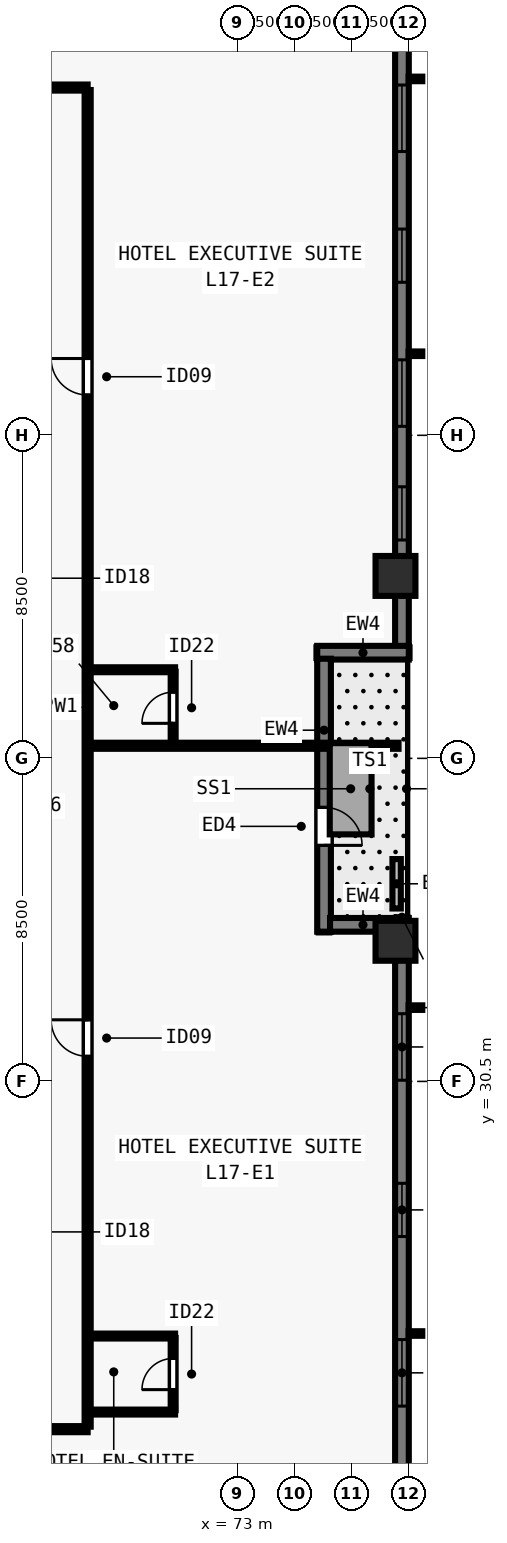
"""IFC4 building model, lengths in metres.
Left out: names, types, materials, properties, quantities, classifications, styles, units other than length and angle.
Written with IfcOpenShell. Run it as: python <this file> out.ifc"""

import sys

from ifc_helpers import new_model, si_unit, direction, frame, frame_2d, origin, origin_2d, place, context, subcontext, project, spatial, rectangle, extrude, element, fill, save


model = new_model("IFC4")
c1 = context("Model", 3, precision=1e-05, world=origin(), true_north=direction((0.0, 1.0)))
c2 = subcontext(c1, "Body", "Model", "MODEL_VIEW")
j1 = project(units=[si_unit("LENGTHUNIT", "METRE"), si_unit("PLANEANGLEUNIT", "RADIAN")], contexts=[c1])
p1 = place(None, origin())
s1 = spatial("IfcSite", under=j1, at=p1, CompositionType="ELEMENT")
p2 = place(p1, origin())
s2 = spatial("IfcBuilding", under=s1, at=p2, CompositionType="ELEMENT")
p3 = place(p2, frame((0.0, 0.0, 65.5)))
s3 = spatial("IfcBuildingStorey", under=s2, at=p3, CompositionType="ELEMENT", Elevation=65.5)
for number, where, z_axis, x_axis in (
    (1, (77.15, 34.2, 0.0), (0.0, 0.0, 1.0), (0.0, 1.0, 0.0)),
    (2, (77.15, 43.8, 0.0), (0.0, 0.0, 1.0), (0.0, 1.0, 0.0)),
):
    element("IfcColumn", number, at=place(p3, frame(where, z_axis=z_axis, x_axis=x_axis)), inside=s3, PredefinedType="COLUMN", context=c2, shape_type="SweptSolid", body=[
        extrude(rectangle(XDim=1.05, YDim=1.05, at=origin_2d()), origin(), (0.0, 0.0, 1.0), 3.5),
    ])
p4 = place(p3, frame((77.32, 34.8, 0.0), z_axis=(0.0, 0.0, 1.0), x_axis=(0.0, -1.0, 0.0)))
e3 = element("IfcWall", 3, at=p4, inside=s3, PredefinedType="SOLIDWALL", context=c2, shape_type="SweptSolid", body=[
    extrude(rectangle(XDim=17.962, YDim=0.36, at=frame_2d((8.981, 0.0))), origin(), (0.0, 0.0, 1.0), 3.28),
])
p5 = place(p4, frame((2.519, 0.0, 0.8)))
e4 = element("IfcOpeningElement", 4, at=p5, cuts=e3, PredefinedType="OPENING", context=c2, shape_type="SweptSolid", body=[
    extrude(rectangle(XDim=1.75, YDim=1.544, at=frame_2d((0.875, 0.772))), frame((0.0, 0.19, 0.0), z_axis=(0.0, -1.0, 0.0), x_axis=(1.0, 0.0, 0.0)), (0.0, 0.0, 1.0), 0.38),
])
p6 = place(p4, frame((6.981, 0.0, 0.8)))
e5 = element("IfcOpeningElement", 5, at=p6, cuts=e3, PredefinedType="OPENING", context=c2, shape_type="SweptSolid", body=[
    extrude(rectangle(XDim=1.4, YDim=1.544, at=frame_2d((0.7, 0.772))), frame((0.0, 0.19, 0.0), z_axis=(0.0, -1.0, 0.0), x_axis=(1.0, 0.0, 0.0)), (0.0, 0.0, 1.0), 0.38),
])
p7 = place(p4, frame((11.093, 0.0, 0.8)))
e6 = element("IfcOpeningElement", 6, at=p7, cuts=e3, PredefinedType="OPENING", context=c2, shape_type="SweptSolid", body=[
    extrude(rectangle(XDim=1.75, YDim=1.544, at=frame_2d((0.875, 0.772))), frame((0.0, 0.19, 0.0), z_axis=(0.0, -1.0, 0.0), x_axis=(1.0, 0.0, 0.0)), (0.0, 0.0, 1.0), 0.38),
])
p8 = place(p3, frame((77.32, 61.5, 0.0), z_axis=(0.0, 0.0, 1.0), x_axis=(0.0, -1.0, 0.0)))
e7 = element("IfcWall", 7, at=p8, inside=s3, PredefinedType="SOLIDWALL", context=c2, shape_type="SweptSolid", body=[
    extrude(rectangle(XDim=19.562, YDim=0.36, at=frame_2d((9.781, 0.0))), origin(), (0.0, 0.0, 1.0), 3.28),
])
p9 = place(p8, frame((4.783, 0.0, 0.8)))
e8 = element("IfcOpeningElement", 8, at=p9, cuts=e7, PredefinedType="OPENING", context=c2, shape_type="SweptSolid", body=[
    extrude(rectangle(XDim=1.75, YDim=1.544, at=frame_2d((0.875, 0.772))), frame((0.0, 0.19, 0.0), z_axis=(0.0, -1.0, 0.0), x_axis=(1.0, 0.0, 0.0)), (0.0, 0.0, 1.0), 0.38),
])
p10 = place(p8, frame((8.573, 0.0, 0.8)))
e9 = element("IfcOpeningElement", 9, at=p10, cuts=e7, PredefinedType="OPENING", context=c2, shape_type="SweptSolid", body=[
    extrude(rectangle(XDim=1.4, YDim=1.544, at=frame_2d((0.7, 0.772))), frame((0.0, 0.19, 0.0), z_axis=(0.0, -1.0, 0.0), x_axis=(1.0, 0.0, 0.0)), (0.0, 0.0, 1.0), 0.38),
])
p11 = place(p8, frame((12.014, 0.0, 0.8)))
e10 = element("IfcOpeningElement", 10, at=p11, cuts=e7, PredefinedType="OPENING", context=c2, shape_type="SweptSolid", body=[
    extrude(rectangle(XDim=1.75, YDim=1.544, at=frame_2d((0.875, 0.772))), frame((0.0, 0.19, 0.0), z_axis=(0.0, -1.0, 0.0), x_axis=(1.0, 0.0, 0.0)), (0.0, 0.0, 1.0), 0.38),
])
p12 = place(p8, frame((15.354, 0.0, 0.8)))
e11 = element("IfcOpeningElement", 11, at=p12, cuts=e7, PredefinedType="OPENING", context=c2, shape_type="SweptSolid", body=[
    extrude(rectangle(XDim=1.4, YDim=1.544, at=frame_2d((0.7, 0.772))), frame((0.0, 0.19, 0.0), z_axis=(0.0, -1.0, 0.0), x_axis=(1.0, 0.0, 0.0)), (0.0, 0.0, 1.0), 0.38),
])
p13 = place(p3, frame((77.5, 41.78, 0.0), z_axis=(0.0, 0.0, 1.0), x_axis=(-1.0, 0.0, 0.0)))
e12 = element("IfcWall", 12, at=p13, inside=s3, PredefinedType="SOLIDWALL", context=c2, shape_type="SweptSolid", body=[
    extrude(rectangle(XDim=2.41, YDim=0.36, at=frame_2d((1.205, 0.0))), origin(), (0.0, 0.0, 1.0), 3.28),
])
p14 = place(p3, frame((75.27, 41.622, 0.0), z_axis=(0.0, 0.0, 1.0), x_axis=(0.0, -1.0, 0.0)))
e13 = element("IfcWall", 13, at=p14, inside=s3, PredefinedType="SOLIDWALL", context=c2, shape_type="SweptSolid", body=[
    extrude(rectangle(XDim=7.182, YDim=0.36, at=frame_2d((3.591, 0.0))), origin(), (0.0, 0.0, 1.0), 3.28),
])
p15 = place(p14, frame((3.911, 0.0, 0.0)))
e14 = element("IfcOpeningElement", 14, at=p15, cuts=e13, PredefinedType="OPENING", context=c2, shape_type="SweptSolid", body=[
    extrude(rectangle(XDim=1.0, YDim=2.15, at=frame_2d((0.5, 1.075))), frame((0.0, 0.19, 0.0), z_axis=(0.0, -1.0, 0.0), x_axis=(1.0, 0.0, 0.0)), (0.0, 0.0, 1.0), 0.38),
])
p16 = place(p3, frame((75.428, 34.62, 0.0), z_axis=(0.0, 0.0, 1.0), x_axis=(1.0, 0.0, 0.0)))
e15 = element("IfcWall", 15, at=p16, inside=s3, PredefinedType="SOLIDWALL", context=c2, shape_type="SweptSolid", body=[
    extrude(rectangle(XDim=1.734, YDim=0.36, at=frame_2d((0.867, 0.0))), origin(), (0.0, 0.0, 1.0), 3.28),
])
p17 = place(p3, frame((77.18, 35.05, 0.0), z_axis=(0.0, 0.0, 1.0), x_axis=(0.0, 1.0, 0.0)))
e16 = element("IfcWall", 16, at=p17, inside=s3, PredefinedType="PARAPET", context=c2, shape_type="SweptSolid", body=[
    extrude(rectangle(XDim=1.3, YDim=0.22, at=frame_2d((0.65, 0.0))), origin(), (0.0, 0.0, 1.0), 0.55),
])
p18 = place(p3, frame((34.95, 21.35, 0.0), z_axis=(0.0, 0.0, 1.0), x_axis=(1.0, 0.0, 0.0)))
e17 = element("IfcWall", 17, at=p18, inside=s3, PredefinedType="PARTITIONING", context=c2, shape_type="SweptSolid", body=[
    extrude(rectangle(XDim=34.1, YDim=0.16, at=frame_2d((17.05, 0.0))), origin(), (0.0, 0.0, 1.0), 3.28),
])
p19 = place(p18, frame((3.614, 0.0, 0.0)))
e18 = element("IfcOpeningElement", 18, at=p19, cuts=e17, PredefinedType="OPENING", context=c2, shape_type="SweptSolid", body=[
    extrude(rectangle(XDim=0.96, YDim=2.15, at=frame_2d((0.48, 1.075))), frame((0.0, 0.09, 0.0), z_axis=(0.0, -1.0, 0.0), x_axis=(1.0, 0.0, 0.0)), (0.0, 0.0, 1.0), 0.18),
])
p20 = place(p18, frame((17.56, 0.0, 0.0)))
e19 = element("IfcOpeningElement", 19, at=p20, cuts=e17, PredefinedType="OPENING", context=c2, shape_type="SweptSolid", body=[
    extrude(rectangle(XDim=0.96, YDim=2.15, at=frame_2d((0.48, 1.075))), frame((0.0, 0.09, 0.0), z_axis=(0.0, -1.0, 0.0), x_axis=(1.0, 0.0, 0.0)), (0.0, 0.0, 1.0), 0.18),
])
p21 = place(p18, frame((30.516, 0.0, 0.0)))
e20 = element("IfcOpeningElement", 20, at=p21, cuts=e17, PredefinedType="OPENING", context=c2, shape_type="SweptSolid", body=[
    extrude(rectangle(XDim=0.96, YDim=2.15, at=frame_2d((0.48, 1.075))), frame((0.0, 0.09, 0.0), z_axis=(0.0, -1.0, 0.0), x_axis=(1.0, 0.0, 0.0)), (0.0, 0.0, 1.0), 0.18),
])
p22 = place(p3, frame((34.95, 56.65, 0.0), z_axis=(0.0, 0.0, 1.0), x_axis=(1.0, 0.0, 0.0)))
e21 = element("IfcWall", 21, at=p22, inside=s3, PredefinedType="PARTITIONING", context=c2, shape_type="SweptSolid", body=[
    extrude(rectangle(XDim=34.1, YDim=0.16, at=frame_2d((17.05, 0.0))), origin(), (0.0, 0.0, 1.0), 3.28),
])
p23 = place(p22, frame((4.166, 0.0, 0.0)))
e22 = element("IfcOpeningElement", 22, at=p23, cuts=e21, PredefinedType="OPENING", context=c2, shape_type="SweptSolid", body=[
    extrude(rectangle(XDim=0.96, YDim=2.15, at=frame_2d((0.48, 1.075))), frame((0.0, 0.09, 0.0), z_axis=(0.0, -1.0, 0.0), x_axis=(1.0, 0.0, 0.0)), (0.0, 0.0, 1.0), 0.18),
])
p24 = place(p22, frame((17.73, 0.0, 0.0)))
e23 = element("IfcOpeningElement", 23, at=p24, cuts=e21, PredefinedType="OPENING", context=c2, shape_type="SweptSolid", body=[
    extrude(rectangle(XDim=0.96, YDim=2.15, at=frame_2d((0.48, 1.075))), frame((0.0, 0.09, 0.0), z_axis=(0.0, -1.0, 0.0), x_axis=(1.0, 0.0, 0.0)), (0.0, 0.0, 1.0), 0.18),
])
p25 = place(p22, frame((30.134, 0.0, 0.0)))
e24 = element("IfcOpeningElement", 24, at=p25, cuts=e21, PredefinedType="OPENING", context=c2, shape_type="SweptSolid", body=[
    extrude(rectangle(XDim=0.96, YDim=2.15, at=frame_2d((0.48, 1.075))), frame((0.0, 0.09, 0.0), z_axis=(0.0, -1.0, 0.0), x_axis=(1.0, 0.0, 0.0)), (0.0, 0.0, 1.0), 0.18),
])
p26 = place(p3, frame((69.05, 21.415, 0.0), z_axis=(0.0, 0.0, 1.0), x_axis=(0.0, 1.0, 0.0)))
e25 = element("IfcWall", 25, at=p26, inside=s3, PredefinedType="PARTITIONING", context=c2, shape_type="SweptSolid", body=[
    extrude(rectangle(XDim=35.17, YDim=0.16, at=frame_2d((17.585, 0.0))), origin(), (0.0, 0.0, 1.0), 3.28),
])
p27 = place(p26, frame((9.746, 0.0, 0.0)))
e26 = element("IfcOpeningElement", 26, at=p27, cuts=e25, PredefinedType="OPENING", context=c2, shape_type="SweptSolid", body=[
    extrude(rectangle(XDim=0.96, YDim=2.15, at=frame_2d((0.48, 1.075))), frame((0.0, 0.09, 0.0), z_axis=(0.0, -1.0, 0.0), x_axis=(1.0, 0.0, 0.0)), (0.0, 0.0, 1.0), 0.18),
])
p28 = place(p26, frame((27.146, 0.0, 0.0)))
e27 = element("IfcOpeningElement", 27, at=p28, cuts=e25, PredefinedType="OPENING", context=c2, shape_type="SweptSolid", body=[
    extrude(rectangle(XDim=0.96, YDim=2.15, at=frame_2d((0.48, 1.075))), frame((0.0, 0.09, 0.0), z_axis=(0.0, -1.0, 0.0), x_axis=(1.0, 0.0, 0.0)), (0.0, 0.0, 1.0), 0.18),
])
p29 = place(p3, frame((69.115, 21.8, 0.0), z_axis=(0.0, 0.0, 1.0), x_axis=(1.0, 0.0, 0.0)))
e28 = element("IfcWall", 28, at=p29, inside=s3, PredefinedType="PLUMBINGWALL", context=c2, shape_type="SweptSolid", body=[
    extrude(rectangle(XDim=2.235, YDim=0.13, at=frame_2d((1.118, 0.0))), origin(), (0.0, 0.0, 1.0), 2.849),
])
p30 = place(p3, frame((69.115, 23.8, 0.0), z_axis=(0.0, 0.0, 1.0), x_axis=(1.0, 0.0, 0.0)))
e29 = element("IfcWall", 29, at=p30, inside=s3, PredefinedType="PLUMBINGWALL", context=c2, shape_type="SweptSolid", body=[
    extrude(rectangle(XDim=2.235, YDim=0.13, at=frame_2d((1.118, 0.0))), origin(), (0.0, 0.0, 1.0), 3.28),
])
p31 = place(p3, frame((71.3, 21.85, 0.0), z_axis=(0.0, 0.0, 1.0), x_axis=(0.0, 1.0, 0.0)))
e30 = element("IfcWall", 30, at=p31, inside=s3, PredefinedType="PLUMBINGWALL", context=c2, shape_type="SweptSolid", body=[
    extrude(rectangle(XDim=1.9, YDim=0.13, at=frame_2d((0.95, 0.0))), origin(), (0.0, 0.0, 1.0), 3.28),
])
p32 = place(p31, frame((0.54, 0.0, 0.0)))
e31 = element("IfcOpeningElement", 31, at=p32, cuts=e30, PredefinedType="OPENING", context=c2, shape_type="SweptSolid", body=[
    extrude(rectangle(XDim=0.82, YDim=2.1, at=frame_2d((0.41, 1.05))), frame((0.0, 0.075, 0.0), z_axis=(0.0, -1.0, 0.0), x_axis=(1.0, 0.0, 0.0)), (0.0, 0.0, 1.0), 0.15),
])
p33 = place(p3, frame((69.115, 39.332, 0.0), z_axis=(0.0, 0.0, 1.0), x_axis=(1.0, 0.0, 0.0)))
e32 = element("IfcWall", 32, at=p33, inside=s3, PredefinedType="PARTITIONING", context=c2, shape_type="SweptSolid", body=[
    extrude(rectangle(XDim=8.115, YDim=0.16, at=frame_2d((4.058, 0.0))), origin(), (0.0, 0.0, 1.0), 3.28),
])
p34 = place(p3, frame((69.115, 41.332, 0.0), z_axis=(0.0, 0.0, 1.0), x_axis=(1.0, 0.0, 0.0)))
e33 = element("IfcWall", 33, at=p34, inside=s3, PredefinedType="PLUMBINGWALL", context=c2, shape_type="SweptSolid", body=[
    extrude(rectangle(XDim=2.235, YDim=0.13, at=frame_2d((1.118, 0.0))), origin(), (0.0, 0.0, 1.0), 3.28),
])
p35 = place(p3, frame((71.3, 39.396, 0.0), z_axis=(0.0, 0.0, 1.0), x_axis=(0.0, 1.0, 0.0)))
e34 = element("IfcWall", 34, at=p35, inside=s3, PredefinedType="PLUMBINGWALL", context=c2, shape_type="SweptSolid", body=[
    extrude(rectangle(XDim=1.885, YDim=0.13, at=frame_2d((0.942, 0.0))), origin(), (0.0, 0.0, 1.0), 3.28),
])
p36 = place(p35, frame((0.525, 0.0, 0.0)))
e35 = element("IfcOpeningElement", 35, at=p36, cuts=e34, PredefinedType="OPENING", context=c2, shape_type="SweptSolid", body=[
    extrude(rectangle(XDim=0.82, YDim=2.1, at=frame_2d((0.41, 1.05))), frame((0.0, 0.075, 0.0), z_axis=(0.0, -1.0, 0.0), x_axis=(1.0, 0.0, 0.0)), (0.0, 0.0, 1.0), 0.15),
])
p37 = place(p5, origin())
e36 = element("IfcWindow", 36, at=p37, inside=s3, PartitioningType="SINGLE_PANEL", PredefinedType="WINDOW", context=c2, shape_type="SweptSolid", body=[
    extrude(rectangle(XDim=1.75, YDim=1.544, at=frame_2d((0.875, 0.772))), frame((0.0, -0.05, 0.0), z_axis=(0.0, -1.0, 0.0), x_axis=(1.0, 0.0, 0.0)), (0.0, 0.0, 1.0), 0.06),
])
fill(e4, e36)
p38 = place(p6, origin())
e37 = element("IfcWindow", 37, at=p38, inside=s3, PartitioningType="SINGLE_PANEL", PredefinedType="WINDOW", context=c2, shape_type="SweptSolid", body=[
    extrude(rectangle(XDim=1.4, YDim=1.544, at=frame_2d((0.7, 0.772))), frame((0.0, -0.05, 0.0), z_axis=(0.0, -1.0, 0.0), x_axis=(1.0, 0.0, 0.0)), (0.0, 0.0, 1.0), 0.06),
])
fill(e5, e37)
p39 = place(p7, origin())
e38 = element("IfcWindow", 38, at=p39, inside=s3, PartitioningType="SINGLE_PANEL", PredefinedType="WINDOW", context=c2, shape_type="SweptSolid", body=[
    extrude(rectangle(XDim=1.75, YDim=1.544, at=frame_2d((0.875, 0.772))), frame((0.0, -0.05, 0.0), z_axis=(0.0, -1.0, 0.0), x_axis=(1.0, 0.0, 0.0)), (0.0, 0.0, 1.0), 0.06),
])
fill(e6, e38)
p40 = place(p9, origin())
e39 = element("IfcWindow", 39, at=p40, inside=s3, PartitioningType="SINGLE_PANEL", PredefinedType="WINDOW", context=c2, shape_type="SweptSolid", body=[
    extrude(rectangle(XDim=1.75, YDim=1.544, at=frame_2d((0.875, 0.772))), frame((0.0, -0.05, 0.0), z_axis=(0.0, -1.0, 0.0), x_axis=(1.0, 0.0, 0.0)), (0.0, 0.0, 1.0), 0.06),
])
fill(e8, e39)
p41 = place(p10, origin())
e40 = element("IfcWindow", 40, at=p41, inside=s3, PartitioningType="SINGLE_PANEL", PredefinedType="WINDOW", context=c2, shape_type="SweptSolid", body=[
    extrude(rectangle(XDim=1.4, YDim=1.544, at=frame_2d((0.7, 0.772))), frame((0.0, -0.05, 0.0), z_axis=(0.0, -1.0, 0.0), x_axis=(1.0, 0.0, 0.0)), (0.0, 0.0, 1.0), 0.06),
])
fill(e9, e40)
p42 = place(p11, origin())
e41 = element("IfcWindow", 41, at=p42, inside=s3, PartitioningType="SINGLE_PANEL", PredefinedType="WINDOW", context=c2, shape_type="SweptSolid", body=[
    extrude(rectangle(XDim=1.75, YDim=1.544, at=frame_2d((0.875, 0.772))), frame((0.0, -0.05, 0.0), z_axis=(0.0, -1.0, 0.0), x_axis=(1.0, 0.0, 0.0)), (0.0, 0.0, 1.0), 0.06),
])
fill(e10, e41)
p43 = place(p12, origin())
e42 = element("IfcWindow", 42, at=p43, inside=s3, PartitioningType="SINGLE_PANEL", PredefinedType="WINDOW", context=c2, shape_type="SweptSolid", body=[
    extrude(rectangle(XDim=1.4, YDim=1.544, at=frame_2d((0.7, 0.772))), frame((0.0, -0.05, 0.0), z_axis=(0.0, -1.0, 0.0), x_axis=(1.0, 0.0, 0.0)), (0.0, 0.0, 1.0), 0.06),
])
fill(e11, e42)
p44 = place(p15, origin())
e43 = element("IfcDoor", 43, at=p44, inside=s3, OperationType="SINGLE_SWING_RIGHT", PredefinedType="DOOR", context=c2, shape_type="SweptSolid", body=[
    extrude(rectangle(XDim=1.0, YDim=2.15, at=frame_2d((0.5, 1.075))), frame((0.0, 0.025, 0.0), z_axis=(0.0, -1.0, 0.0), x_axis=(1.0, 0.0, 0.0)), (0.0, 0.0, 1.0), 0.05),
])
fill(e14, e43)
p45 = place(p32, origin())
e44 = element("IfcDoor", 44, at=p45, inside=s3, OperationType="SINGLE_SWING_LEFT", PredefinedType="DOOR", context=c2, shape_type="SweptSolid", body=[
    extrude(rectangle(XDim=0.82, YDim=2.1, at=frame_2d((0.41, 1.05))), frame((0.0, 0.025, 0.0), z_axis=(0.0, -1.0, 0.0), x_axis=(1.0, 0.0, 0.0)), (0.0, 0.0, 1.0), 0.05),
])
fill(e31, e44)
p46 = place(p27, origin())
e45 = element("IfcDoor", 45, at=p46, inside=s3, OperationType="SINGLE_SWING_RIGHT", PredefinedType="DOOR", context=c2, shape_type="SweptSolid", body=[
    extrude(rectangle(XDim=0.96, YDim=2.15, at=frame_2d((0.48, 1.075))), frame((0.0, 0.025, 0.0), z_axis=(0.0, -1.0, 0.0), x_axis=(1.0, 0.0, 0.0)), (0.0, 0.0, 1.0), 0.05),
])
fill(e26, e45)
p47 = place(p36, origin())
e46 = element("IfcDoor", 46, at=p47, inside=s3, OperationType="SINGLE_SWING_LEFT", PredefinedType="DOOR", context=c2, shape_type="SweptSolid", body=[
    extrude(rectangle(XDim=0.82, YDim=2.1, at=frame_2d((0.41, 1.05))), frame((0.0, 0.025, 0.0), z_axis=(0.0, -1.0, 0.0), x_axis=(1.0, 0.0, 0.0)), (0.0, 0.0, 1.0), 0.05),
])
fill(e35, e46)
p48 = place(p28, origin())
e47 = element("IfcDoor", 47, at=p48, inside=s3, OperationType="SINGLE_SWING_RIGHT", PredefinedType="DOOR", context=c2, shape_type="SweptSolid", body=[
    extrude(rectangle(XDim=0.96, YDim=2.15, at=frame_2d((0.48, 1.075))), frame((0.0, 0.025, 0.0), z_axis=(0.0, -1.0, 0.0), x_axis=(1.0, 0.0, 0.0)), (0.0, 0.0, 1.0), 0.05),
])
fill(e27, e47)
save(model, sys.argv[1])
